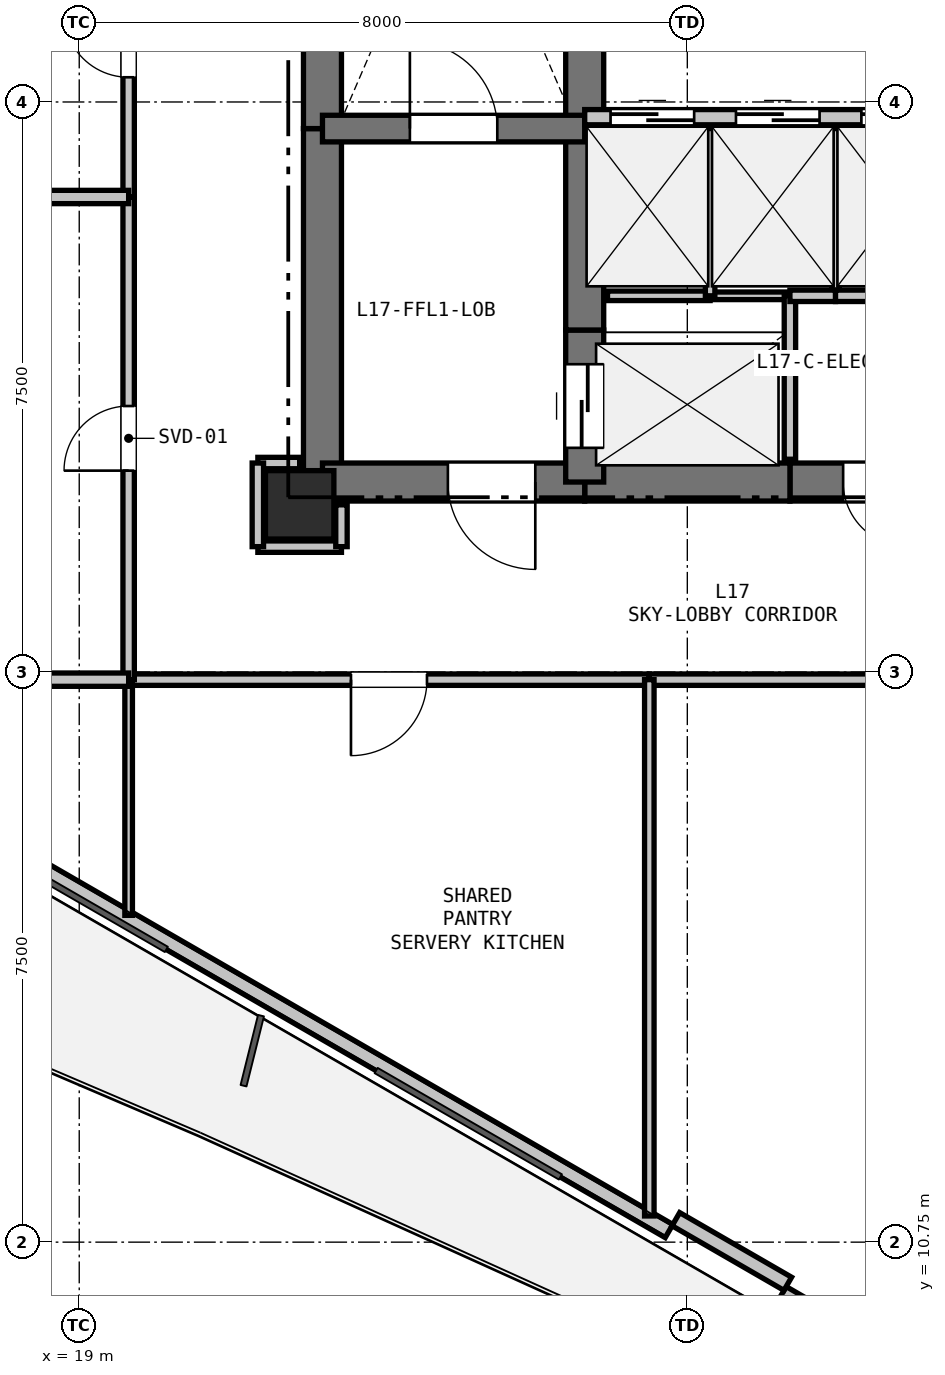
"""IFC4 building model, lengths in metres.
Left out: names, types, materials, properties, quantities, classifications, styles, units other than length and angle.
Written with IfcOpenShell. Run it as: python <this file> out.ifc"""

import sys

from ifc_helpers import new_model, si_unit, direction, frame, frame_2d, origin, origin_2d, place, context, subcontext, project, spatial, rectangle, extrude, element, fill, save


model = new_model("IFC4")
c1 = context("Model", 3, precision=1e-05, world=origin(), true_north=direction((0.0, 1.0)))
c2 = subcontext(c1, "Body", "Model", "MODEL_VIEW")
j1 = project(units=[si_unit("LENGTHUNIT", "METRE"), si_unit("PLANEANGLEUNIT", "RADIAN")], contexts=[c1])
p1 = place(None, origin())
s1 = spatial("IfcSite", under=j1, at=p1, CompositionType="ELEMENT")
p2 = place(p1, origin())
s2 = spatial("IfcBuilding", under=s1, at=p2, CompositionType="ELEMENT")
p3 = place(p2, frame((0.0, 0.0, 62.1)))
s3 = spatial("IfcBuildingStorey", under=s2, at=p3, CompositionType="ELEMENT", Elevation=62.1)
p4 = place(p3, frame((21.9, 20.45, 0.0), z_axis=(0.0, 0.0, 1.0), x_axis=(1.0, 0.0, 0.0)))
e1 = element("IfcColumn", 1, at=p4, inside=s3, PredefinedType="COLUMN", context=c2, shape_type="SweptSolid", body=[
    extrude(rectangle(XDim=0.9, YDim=0.9, at=origin_2d()), origin(), (0.0, 0.0, 1.0), 4.8),
])
p5 = place(p3, frame((39.207, 3.71, 0.0), z_axis=(0.0, 0.0, 1.0), x_axis=(-0.86603192154, 0.499988710747, 0.0)))
e2 = element("IfcWall", 2, at=p5, inside=s3, PredefinedType="SOLIDWALL", context=c2, shape_type="SweptSolid", body=[
    extrude(rectangle(XDim=12.673, YDim=0.275, at=frame_2d((6.336, 0.0))), origin(), (0.0, 0.0, 1.0), 2.865),
])
p6 = place(p5, frame((8.136, 0.0, 0.0)))
e3 = element("IfcOpeningElement", 3, at=p6, cuts=e2, PredefinedType="OPENING", context=c2, shape_type="SweptSolid", body=[
    extrude(rectangle(XDim=1.0, YDim=2.1, at=frame_2d((0.5, 1.05))), frame((0.0, 0.147, 0.0), z_axis=(0.0, -1.0, 0.0), x_axis=(1.0, 0.0, 0.0)), (0.0, 0.0, 1.0), 0.295),
])
p7 = place(p3, frame((26.76, 10.896, 0.0), z_axis=(0.0, 0.0, 1.0), x_axis=(-0.866027351828, 0.499996625875, 0.0)))
e4 = element("IfcWall", 4, at=p7, inside=s3, PredefinedType="PARAPET", context=c2, shape_type="SweptSolid", body=[
    extrude(rectangle(XDim=11.973, YDim=0.2, at=frame_2d((5.987, 0.0))), origin(), (0.0, 0.0, 1.0), 0.2),
])
p8 = place(p3, frame((28.322, 10.202, 0.0), z_axis=(0.0, 0.0, 1.0), x_axis=(-0.86605165483, 0.499954529098, 0.0)))
e5 = element("IfcWall", 5, at=p8, inside=s3, PredefinedType="PARAPET", context=c2, shape_type="SweptSolid", body=[
    extrude(rectangle(XDim=1.7, YDim=0.2, at=frame_2d((0.85, 0.0))), origin(), (0.0, 0.0, 1.0), 4.1),
])
p9 = place(p3, frame((22.2, 20.75, 0.0), z_axis=(0.0, 0.0, 1.0), x_axis=(0.0, 1.0, 0.0)))
e6 = element("IfcWall", 6, at=p9, inside=s3, PredefinedType="SHEAR", context=c2, shape_type="SweptSolid", body=[
    extrude(rectangle(XDim=4.65, YDim=0.5, at=frame_2d((2.325, 0.0))), origin(), (0.0, 0.0, 1.0), 4.48),
])
p10 = place(p3, frame((22.2, 25.4, 0.0), z_axis=(0.0, 0.0, 1.0), x_axis=(0.0, 1.0, 0.0)))
e7 = element("IfcWall", 7, at=p10, inside=s3, PredefinedType="SHEAR", context=c2, shape_type="SweptSolid", body=[
    extrude(rectangle(XDim=7.35, YDim=0.5, at=frame_2d((3.675, 0.0))), origin(), (0.0, 0.0, 1.0), 4.48),
])
p11 = place(p3, frame((30.6, 20.75, 0.0), z_axis=(0.0, 0.0, 1.0), x_axis=(-1.0, 0.0, 0.0)))
e8 = element("IfcWall", 8, at=p11, inside=s3, PredefinedType="SHEAR", context=c2, shape_type="SweptSolid", body=[
    extrude(rectangle(XDim=2.25, YDim=0.5, at=frame_2d((1.125, 0.0))), origin(), (0.0, 0.0, 1.0), 4.48),
])
p12 = place(p11, frame((0.7, 0.0, 0.0)))
e9 = element("IfcOpeningElement", 9, at=p12, cuts=e8, PredefinedType="OPENING", context=c2, shape_type="SweptSolid", body=[
    extrude(rectangle(XDim=0.85, YDim=2.1, at=frame_2d((0.425, 1.05))), frame((0.0, 0.26, 0.0), z_axis=(0.0, -1.0, 0.0), x_axis=(1.0, 0.0, 0.0)), (0.0, 0.0, 1.0), 0.52),
])
p13 = place(p3, frame((28.35, 20.75, 0.0), z_axis=(0.0, 0.0, 1.0), x_axis=(-1.0, 0.0, 0.0)))
e10 = element("IfcWall", 10, at=p13, inside=s3, PredefinedType="SHEAR", context=c2, shape_type="SweptSolid", body=[
    extrude(rectangle(XDim=2.7, YDim=0.5, at=frame_2d((1.35, 0.0))), origin(), (0.0, 0.0, 1.0), 4.48),
])
p14 = place(p3, frame((25.65, 20.75, 0.0), z_axis=(0.0, 0.0, 1.0), x_axis=(-1.0, 0.0, 0.0)))
e11 = element("IfcWall", 11, at=p14, inside=s3, PredefinedType="SHEAR", context=c2, shape_type="SweptSolid", body=[
    extrude(rectangle(XDim=3.45, YDim=0.5, at=frame_2d((1.725, 0.0))), origin(), (0.0, 0.0, 1.0), 4.48),
])
p15 = place(p14, frame((0.65, 0.0, 0.0)))
e12 = element("IfcOpeningElement", 12, at=p15, cuts=e11, PredefinedType="OPENING", context=c2, shape_type="SweptSolid", body=[
    extrude(rectangle(XDim=1.15, YDim=2.15, at=frame_2d((0.575, 1.075))), frame((0.0, 0.26, 0.0), z_axis=(0.0, -1.0, 0.0), x_axis=(1.0, 0.0, 0.0)), (0.0, 0.0, 1.0), 0.52),
])
p16 = place(p3, frame((25.65, 20.75, 0.0), z_axis=(0.0, 0.0, 1.0), x_axis=(0.0, 1.0, 0.0)))
e13 = element("IfcWall", 13, at=p16, inside=s3, PredefinedType="SHEAR", context=c2, shape_type="SweptSolid", body=[
    extrude(rectangle(XDim=2.0, YDim=0.5, at=frame_2d((1.0, 0.0))), origin(), (0.0, 0.0, 1.0), 4.48),
])
p17 = place(p16, frame((0.45, 0.0, 0.0)))
e14 = element("IfcOpeningElement", 14, at=p17, cuts=e13, PredefinedType="OPENING", context=c2, shape_type="SweptSolid", body=[
    extrude(rectangle(XDim=1.1, YDim=2.15, at=frame_2d((0.55, 1.075))), frame((0.0, 0.26, 0.0), z_axis=(0.0, -1.0, 0.0), x_axis=(1.0, 0.0, 0.0)), (0.0, 0.0, 1.0), 0.52),
])
p18 = place(p3, frame((25.65, 22.75, 0.0), z_axis=(0.0, 0.0, 1.0), x_axis=(0.0, 1.0, 0.0)))
e15 = element("IfcWall", 15, at=p18, inside=s3, PredefinedType="SHEAR", context=c2, shape_type="SweptSolid", body=[
    extrude(rectangle(XDim=2.8, YDim=0.5, at=frame_2d((1.4, 0.0))), origin(), (0.0, 0.0, 1.0), 4.48),
])
p19 = place(p3, frame((25.65, 25.55, 0.0), z_axis=(0.0, 0.0, 1.0), x_axis=(0.0, 1.0, 0.0)))
e16 = element("IfcWall", 16, at=p19, inside=s3, PredefinedType="SHEAR", context=c2, shape_type="SweptSolid", body=[
    extrude(rectangle(XDim=2.4, YDim=0.5, at=frame_2d((1.2, 0.0))), origin(), (0.0, 0.0, 1.0), 4.48),
])
p20 = place(p3, frame((22.2, 25.4, 0.0), z_axis=(0.0, 0.0, 1.0), x_axis=(1.0, 0.0, 0.0)))
e17 = element("IfcWall", 17, at=p20, inside=s3, PredefinedType="SHEAR", context=c2, shape_type="SweptSolid", body=[
    extrude(rectangle(XDim=3.45, YDim=0.35, at=frame_2d((1.725, 0.0))), origin(), (0.0, 0.0, 1.0), 4.48),
])
p21 = place(p20, frame((1.15, 0.0, 0.0)))
e18 = element("IfcOpeningElement", 18, at=p21, cuts=e17, PredefinedType="OPENING", context=c2, shape_type="SweptSolid", body=[
    extrude(rectangle(XDim=1.15, YDim=2.15, at=frame_2d((0.575, 1.075))), frame((0.0, 0.185, 0.0), z_axis=(0.0, -1.0, 0.0), x_axis=(1.0, 0.0, 0.0)), (0.0, 0.0, 1.0), 0.37),
])
p22 = place(p3, frame((25.65, 25.55, 0.0), z_axis=(0.0, 0.0, 1.0), x_axis=(1.0, 0.0, 0.0)))
e19 = element("IfcWall", 19, at=p22, inside=s3, PredefinedType="PARTITIONING", context=c2, shape_type="SweptSolid", body=[
    extrude(rectangle(XDim=4.95, YDim=0.2, at=frame_2d((2.475, 0.0))), origin(), (0.0, 0.0, 1.0), 4.48),
])
p23 = place(p22, frame((0.34, 0.0, 0.0)))
e20 = element("IfcOpeningElement", 20, at=p23, cuts=e19, PredefinedType="OPENING", context=c2, shape_type="SweptSolid", body=[
    extrude(rectangle(XDim=1.1, YDim=2.15, at=frame_2d((0.55, 1.075))), frame((0.0, 0.11, 0.0), z_axis=(0.0, -1.0, 0.0), x_axis=(1.0, 0.0, 0.0)), (0.0, 0.0, 1.0), 0.22),
])
p24 = place(p22, frame((1.99, 0.0, 0.0)))
e21 = element("IfcOpeningElement", 21, at=p24, cuts=e19, PredefinedType="OPENING", context=c2, shape_type="SweptSolid", body=[
    extrude(rectangle(XDim=1.1, YDim=2.15, at=frame_2d((0.55, 1.075))), frame((0.0, 0.11, 0.0), z_axis=(0.0, -1.0, 0.0), x_axis=(1.0, 0.0, 0.0)), (0.0, 0.0, 1.0), 0.22),
])
p25 = place(p22, frame((3.64, 0.0, 0.0)))
e22 = element("IfcOpeningElement", 22, at=p25, cuts=e19, PredefinedType="OPENING", context=c2, shape_type="SweptSolid", body=[
    extrude(rectangle(XDim=1.1, YDim=2.15, at=frame_2d((0.55, 1.075))), frame((0.0, 0.11, 0.0), z_axis=(0.0, -1.0, 0.0), x_axis=(1.0, 0.0, 0.0)), (0.0, 0.0, 1.0), 0.22),
])
p26 = place(p3, frame((25.95, 23.2, 0.0), z_axis=(0.0, 0.0, 1.0), x_axis=(1.0, 0.0, 0.0)))
e23 = element("IfcWall", 23, at=p26, inside=s3, PredefinedType="PARTITIONING", context=c2, shape_type="SweptSolid", body=[
    extrude(rectangle(XDim=1.35, YDim=0.125, at=frame_2d((0.675, 0.0))), origin(), (0.0, 0.0, 1.0), 4.48),
])
p27 = place(p3, frame((27.3, 23.2, 0.0), z_axis=(0.0, 0.0, 1.0), x_axis=(1.0, 0.0, 0.0)))
e24 = element("IfcWall", 24, at=p27, inside=s3, PredefinedType="PARTITIONING", context=c2, shape_type="SweptSolid", body=[
    extrude(rectangle(XDim=1.05, YDim=0.1, at=frame_2d((0.525, 0.0))), origin(), (0.0, 0.0, 1.0), 4.48),
])
p28 = place(p3, frame((28.35, 23.2, 0.0), z_axis=(0.0, 0.0, 1.0), x_axis=(0.0, -1.0, 0.0)))
e25 = element("IfcWall", 25, at=p28, inside=s3, PredefinedType="PARTITIONING", context=c2, shape_type="SweptSolid", body=[
    extrude(rectangle(XDim=2.15, YDim=0.15, at=frame_2d((1.075, 0.0))), origin(), (0.0, 0.0, 1.0), 4.48),
])
p29 = place(p3, frame((27.3, 25.4, 0.0), z_axis=(0.0, 0.0, 1.0), x_axis=(0.0, -1.0, 0.0)))
e26 = element("IfcWall", 26, at=p29, inside=s3, PredefinedType="PARTITIONING", context=c2, shape_type="SweptSolid", body=[
    extrude(rectangle(XDim=2.2, YDim=0.125, at=frame_2d((1.1, 0.0))), origin(), (0.0, 0.0, 1.0), 4.48),
])
p30 = place(p3, frame((28.95, 25.4, 0.0), z_axis=(0.0, 0.0, 1.0), x_axis=(0.0, -1.0, 0.0)))
e27 = element("IfcWall", 27, at=p30, inside=s3, PredefinedType="PARTITIONING", context=c2, shape_type="SweptSolid", body=[
    extrude(rectangle(XDim=2.2, YDim=0.1, at=frame_2d((1.1, 0.0))), origin(), (0.0, 0.0, 1.0), 4.48),
])
p31 = place(p3, frame((28.95, 23.2, 0.0), z_axis=(0.0, 0.0, 1.0), x_axis=(-1.0, 0.0, 0.0)))
e28 = element("IfcWall", 28, at=p31, inside=s3, PredefinedType="PARTITIONING", context=c2, shape_type="SweptSolid", body=[
    extrude(rectangle(XDim=0.6, YDim=0.15, at=frame_2d((0.3, 0.0))), origin(), (0.0, 0.0, 1.0), 4.48),
])
p32 = place(p3, frame((30.6, 23.2, 0.0), z_axis=(0.0, 0.0, 1.0), x_axis=(-1.0, 0.0, 0.0)))
e29 = element("IfcWall", 29, at=p32, inside=s3, PredefinedType="PARTITIONING", context=c2, shape_type="SweptSolid", body=[
    extrude(rectangle(XDim=1.65, YDim=0.15, at=frame_2d((0.825, 0.0))), origin(), (0.0, 0.0, 1.0), 4.48),
])
p33 = place(p3, frame((21.35, 19.9, 0.0), z_axis=(0.0, 0.0, 1.0), x_axis=(1.0, 0.0, 0.0)))
e30 = element("IfcWall", 30, at=p33, inside=s3, PredefinedType="PARTITIONING", context=c2, shape_type="SweptSolid", body=[
    extrude(rectangle(XDim=1.1, YDim=0.15, at=frame_2d((0.55, 0.0))), origin(), (0.0, 0.0, 1.0), 4.48),
])
p34 = place(p3, frame((22.45, 19.9, 0.0), z_axis=(0.0, 0.0, 1.0), x_axis=(0.0, 1.0, 0.0)))
e31 = element("IfcWall", 31, at=p34, inside=s3, PredefinedType="PARTITIONING", context=c2, shape_type="SweptSolid", body=[
    extrude(rectangle(XDim=0.55, YDim=0.15, at=frame_2d((0.275, 0.0))), origin(), (0.0, 0.0, 1.0), 3.928),
])
p35 = place(p3, frame((35.8, 18.15, 0.0), z_axis=(0.0, 0.0, 1.0), x_axis=(-1.0, 0.0, 0.0)))
e32 = element("IfcWall", 32, at=p35, inside=s3, PredefinedType="PARTITIONING", context=c2, shape_type="SweptSolid", body=[
    extrude(rectangle(XDim=9.3, YDim=0.15, at=frame_2d((4.65, 0.0))), origin(), (0.0, 0.0, 1.0), 2.865),
])
p36 = place(p35, frame((3.75, 0.0, 0.0)))
e33 = element("IfcOpeningElement", 33, at=p36, cuts=e32, PredefinedType="OPENING", context=c2, shape_type="SweptSolid", body=[
    extrude(rectangle(XDim=1.8, YDim=2.2, at=frame_2d((0.9, 1.1))), frame((0.0, 0.085, 0.0), z_axis=(0.0, -1.0, 0.0), x_axis=(1.0, 0.0, 0.0)), (0.0, 0.0, 1.0), 0.17),
])
p37 = place(p3, frame((26.5, 18.15, 0.0), z_axis=(0.0, 0.0, 1.0), x_axis=(-1.0, 0.0, 0.0)))
e34 = element("IfcWall", 34, at=p37, inside=s3, PredefinedType="PARTITIONING", context=c2, shape_type="SweptSolid", body=[
    extrude(rectangle(XDim=6.85, YDim=0.15, at=frame_2d((3.425, 0.0))), origin(), (0.0, 0.0, 1.0), 4.48),
])
p38 = place(p37, frame((2.925, 0.0, 0.0)))
e35 = element("IfcOpeningElement", 35, at=p38, cuts=e34, PredefinedType="OPENING", context=c2, shape_type="SweptSolid", body=[
    extrude(rectangle(XDim=1.0, YDim=2.15, at=frame_2d((0.5, 1.075))), frame((0.0, 0.085, 0.0), z_axis=(0.0, -1.0, 0.0), x_axis=(1.0, 0.0, 0.0)), (0.0, 0.0, 1.0), 0.17),
])
p39 = place(p3, frame((19.65, 18.15, 0.0), z_axis=(0.0, 0.0, 1.0), x_axis=(0.0, 1.0, 0.0)))
e36 = element("IfcWall", 36, at=p39, inside=s3, PredefinedType="PARTITIONING", context=c2, shape_type="SweptSolid", body=[
    extrude(rectangle(XDim=6.35, YDim=0.15, at=frame_2d((3.175, 0.0))), origin(), (0.0, 0.0, 1.0), 2.865),
])
p40 = place(p39, frame((2.75, 0.0, 0.0)))
e37 = element("IfcOpeningElement", 37, at=p40, cuts=e36, PredefinedType="OPENING", context=c2, shape_type="SweptSolid", body=[
    extrude(rectangle(XDim=0.85, YDim=2.1, at=frame_2d((0.425, 1.05))), frame((0.0, 0.085, 0.0), z_axis=(0.0, -1.0, 0.0), x_axis=(1.0, 0.0, 0.0)), (0.0, 0.0, 1.0), 0.17),
])
p41 = place(p3, frame((19.65, 24.5, 0.0), z_axis=(0.0, 0.0, 1.0), x_axis=(0.0, 1.0, 0.0)))
e38 = element("IfcWall", 38, at=p41, inside=s3, PredefinedType="PARTITIONING", context=c2, shape_type="SweptSolid", body=[
    extrude(rectangle(XDim=4.0, YDim=0.15, at=frame_2d((2.0, 0.0))), origin(), (0.0, 0.0, 1.0), 2.865),
])
p42 = place(p41, frame((1.575, 0.0, 0.0)))
e39 = element("IfcOpeningElement", 39, at=p42, cuts=e38, PredefinedType="OPENING", context=c2, shape_type="SweptSolid", body=[
    extrude(rectangle(XDim=0.85, YDim=2.1, at=frame_2d((0.425, 1.05))), frame((0.0, 0.085, 0.0), z_axis=(0.0, -1.0, 0.0), x_axis=(1.0, 0.0, 0.0)), (0.0, 0.0, 1.0), 0.17),
])
p43 = place(p3, frame((21.9, 21.0, 0.0), z_axis=(0.0, 0.0, 1.0), x_axis=(-1.0, 0.0, 0.0)))
e40 = element("IfcWall", 40, at=p43, inside=s3, PredefinedType="PARTITIONING", context=c2, shape_type="SweptSolid", body=[
    extrude(rectangle(XDim=0.55, YDim=0.15, at=frame_2d((0.275, 0.0))), origin(), (0.0, 0.0, 1.0), 3.928),
])
p44 = place(p3, frame((21.35, 21.0, 0.0), z_axis=(0.0, 0.0, 1.0), x_axis=(0.0, -1.0, 0.0)))
e41 = element("IfcWall", 41, at=p44, inside=s3, PredefinedType="PARTITIONING", context=c2, shape_type="SweptSolid", body=[
    extrude(rectangle(XDim=1.1, YDim=0.15, at=frame_2d((0.55, 0.0))), origin(), (0.0, 0.0, 1.0), 4.48),
])
p45 = place(p3, frame((26.5, 18.15, 0.0), z_axis=(0.0, 0.0, 1.0), x_axis=(0.0, -1.0, 0.0)))
e42 = element("IfcWall", 42, at=p45, inside=s3, PredefinedType="PARTITIONING", context=c2, shape_type="SweptSolid", body=[
    extrude(rectangle(XDim=7.055, YDim=0.125, at=frame_2d((3.528, 0.0))), origin(), (0.0, 0.0, 1.0), 2.365),
])
p46 = place(p3, frame((19.65, 15.049, 0.0), z_axis=(0.0, 0.0, 1.0), x_axis=(0.0, 1.0, 0.0)))
e43 = element("IfcWall", 43, at=p46, inside=s3, PredefinedType="PARTITIONING", context=c2, shape_type="SweptSolid", body=[
    extrude(rectangle(XDim=3.101, YDim=0.1, at=frame_2d((1.55, 0.0))), origin(), (0.0, 0.0, 1.0), 2.365),
])
p47 = place(p3, frame((3.975, 24.5, 0.0), z_axis=(0.0, 0.0, 1.0), x_axis=(1.0, 0.0, 0.0)))
e44 = element("IfcWall", 44, at=p47, inside=s3, PredefinedType="PLUMBINGWALL", context=c2, shape_type="SweptSolid", body=[
    extrude(rectangle(XDim=15.675, YDim=0.175, at=frame_2d((7.838, 0.0))), origin(), (0.0, 0.0, 1.0), 2.865),
])
p48 = place(p3, frame((19.65, 18.15, 0.0), z_axis=(0.0, 0.0, 1.0), x_axis=(-1.0, 0.0, 0.0)))
e45 = element("IfcWall", 45, at=p48, inside=s3, PredefinedType="PLUMBINGWALL", context=c2, shape_type="SweptSolid", body=[
    extrude(rectangle(XDim=5.161, YDim=0.175, at=frame_2d((2.58, 0.0))), origin(), (0.0, 0.0, 1.0), 2.365),
])
p49 = place(p23, origin())
e46 = element("IfcDoor", 46, at=p49, inside=s3, OperationType="SLIDING_TO_LEFT", PredefinedType="DOOR", context=c2, shape_type="SweptSolid", body=[
    extrude(rectangle(XDim=1.1, YDim=2.15, at=frame_2d((0.55, 1.075))), frame((0.0, 0.025, 0.0), z_axis=(0.0, -1.0, 0.0), x_axis=(1.0, 0.0, 0.0)), (0.0, 0.0, 1.0), 0.05),
])
fill(e20, e46)
p50 = place(p24, origin())
e47 = element("IfcDoor", 47, at=p50, inside=s3, OperationType="SLIDING_TO_LEFT", PredefinedType="DOOR", context=c2, shape_type="SweptSolid", body=[
    extrude(rectangle(XDim=1.1, YDim=2.15, at=frame_2d((0.55, 1.075))), frame((0.0, 0.025, 0.0), z_axis=(0.0, -1.0, 0.0), x_axis=(1.0, 0.0, 0.0)), (0.0, 0.0, 1.0), 0.05),
])
fill(e21, e47)
p51 = place(p25, origin())
e48 = element("IfcDoor", 48, at=p51, inside=s3, OperationType="SLIDING_TO_LEFT", PredefinedType="DOOR", context=c2, shape_type="SweptSolid", body=[
    extrude(rectangle(XDim=1.1, YDim=2.15, at=frame_2d((0.55, 1.075))), frame((0.0, 0.025, 0.0), z_axis=(0.0, -1.0, 0.0), x_axis=(1.0, 0.0, 0.0)), (0.0, 0.0, 1.0), 0.05),
])
fill(e22, e48)
p52 = place(p17, origin())
e49 = element("IfcDoor", 49, at=p52, inside=s3, OperationType="SLIDING_TO_LEFT", PredefinedType="DOOR", context=c2, shape_type="SweptSolid", body=[
    extrude(rectangle(XDim=1.1, YDim=2.15, at=frame_2d((0.55, 1.075))), frame((0.0, 0.025, 0.0), z_axis=(0.0, -1.0, 0.0), x_axis=(1.0, 0.0, 0.0)), (0.0, 0.0, 1.0), 0.05),
])
fill(e14, e49)
p53 = place(p21, origin())
e50 = element("IfcDoor", 50, at=p53, inside=s3, OperationType="SINGLE_SWING_LEFT", PredefinedType="DOOR", context=c2, shape_type="SweptSolid", body=[
    extrude(rectangle(XDim=1.15, YDim=2.15, at=frame_2d((0.575, 1.075))), frame((0.0, 0.025, 0.0), z_axis=(0.0, -1.0, 0.0), x_axis=(1.0, 0.0, 0.0)), (0.0, 0.0, 1.0), 0.05),
])
fill(e18, e50)
p54 = place(p15, origin())
e51 = element("IfcDoor", 51, at=p54, inside=s3, OperationType="SINGLE_SWING_LEFT", PredefinedType="DOOR", context=c2, shape_type="SweptSolid", body=[
    extrude(rectangle(XDim=1.15, YDim=2.15, at=frame_2d((0.575, 1.075))), frame((0.0, 0.025, 0.0), z_axis=(0.0, -1.0, 0.0), x_axis=(1.0, 0.0, 0.0)), (0.0, 0.0, 1.0), 0.05),
])
fill(e12, e51)
p55 = place(p38, origin())
e52 = element("IfcDoor", 52, at=p55, inside=s3, OperationType="SINGLE_SWING_RIGHT", PredefinedType="DOOR", context=c2, shape_type="SweptSolid", body=[
    extrude(rectangle(XDim=1.0, YDim=2.15, at=frame_2d((0.5, 1.075))), frame((0.0, 0.025, 0.0), z_axis=(0.0, -1.0, 0.0), x_axis=(1.0, 0.0, 0.0)), (0.0, 0.0, 1.0), 0.05),
])
fill(e35, e52)
p56 = place(p40, origin())
e53 = element("IfcDoor", 53, at=p56, inside=s3, OperationType="SINGLE_SWING_LEFT", PredefinedType="DOOR", context=c2, shape_type="SweptSolid", body=[
    extrude(rectangle(XDim=0.85, YDim=2.1, at=frame_2d((0.425, 1.05))), frame((0.0, 0.025, 0.0), z_axis=(0.0, -1.0, 0.0), x_axis=(1.0, 0.0, 0.0)), (0.0, 0.0, 1.0), 0.05),
])
fill(e37, e53)
p57 = place(p42, origin())
e54 = element("IfcDoor", 54, at=p57, inside=s3, OperationType="SINGLE_SWING_RIGHT", PredefinedType="DOOR", context=c2, shape_type="SweptSolid", body=[
    extrude(rectangle(XDim=0.85, YDim=2.1, at=frame_2d((0.425, 1.05))), frame((0.0, 0.025, 0.0), z_axis=(0.0, -1.0, 0.0), x_axis=(1.0, 0.0, 0.0)), (0.0, 0.0, 1.0), 0.05),
])
fill(e39, e54)
p58 = place(p12, origin())
e55 = element("IfcDoor", 55, at=p58, inside=s3, OperationType="SINGLE_SWING_LEFT", PredefinedType="DOOR", context=c2, shape_type="SweptSolid", body=[
    extrude(rectangle(XDim=0.85, YDim=2.1, at=frame_2d((0.425, 1.05))), frame((0.0, 0.025, 0.0), z_axis=(0.0, -1.0, 0.0), x_axis=(1.0, 0.0, 0.0)), (0.0, 0.0, 1.0), 0.05),
])
fill(e9, e55)
save(model, sys.argv[1])
